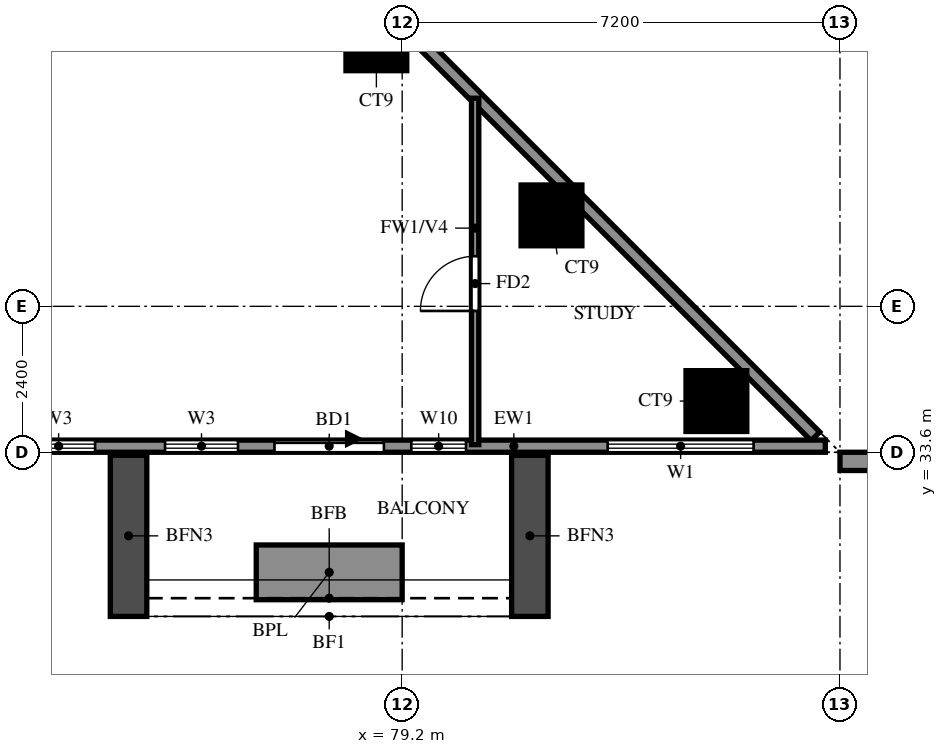
"""IFC4 building model, lengths in metres.
Left out: names, types, materials, properties, quantities, classifications, styles, units other than length and angle.
Written with IfcOpenShell. Run it as: python <this file> out.ifc"""

import sys

from ifc_helpers import new_model, si_unit, direction, frame, frame_2d, origin, origin_2d, place, context, subcontext, project, spatial, rectangle, extrude, source, transform, mapped, element, fill, save


model = new_model("IFC4")
c1 = context("Model", 3, precision=1e-05, world=origin(), true_north=direction((0.0, 1.0)))
c2 = subcontext(c1, "Body", "Model", "MODEL_VIEW")
j1 = project(units=[si_unit("LENGTHUNIT", "METRE"), si_unit("PLANEANGLEUNIT", "RADIAN")], contexts=[c1])
p1 = place(None, origin())
s1 = spatial("IfcSite", under=j1, at=p1, CompositionType="ELEMENT")
p2 = place(p1, origin())
s2 = spatial("IfcBuilding", under=s1, at=p2, CompositionType="ELEMENT")
p3 = place(p2, frame((0.0, 0.0, 79.5)))
s3 = spatial("IfcBuildingStorey", under=s2, at=p3, CompositionType="ELEMENT", Elevation=79.5)
m1 = source(origin(), c2, "Body", "SweptSolid", [
    extrude(rectangle(XDim=1.0, YDim=1.0, at=origin_2d()), origin(), (0.0, 0.0, 1.0), 3.18),
])
for number, where, z_axis, x_axis in (
    (1, (84.367, 34.442, 0.0), (0.0, 0.0, 1.0), (1.0, 0.0, 0.0)),
    (2, (81.656, 37.496, 0.0), (0.0, 0.0, 1.0), (1.0, 0.0, 0.0)),
    (3, (78.776, 40.376, 0.0), (0.0, 0.0, 1.0), (1.0, 0.0, 0.0)),
):
    element("IfcColumn", number, at=place(p3, frame(where, z_axis=z_axis, x_axis=x_axis)), inside=s3, PredefinedType="COLUMN", context=c2, shape_type="MappedRepresentation", body=[
        mapped(m1, transform((0.0, 0.0, 0.0))),
    ])
p4 = place(p3, frame((85.996, 33.863, 0.0), z_axis=(0.0, 0.0, 1.0), x_axis=(-0.707100718496, 0.707112843825, 0.0)))
e4 = element("IfcWall", 4, at=p4, inside=s3, PredefinedType="SOLIDWALL", context=c2, shape_type="SweptSolid", body=[
    extrude(rectangle(XDim=20.135, YDim=0.2, at=frame_2d((10.067, 0.0))), origin(), (0.0, 0.0, 1.0), 3.18),
])
p5 = place(p3, frame((72.5, 33.7, 0.0), z_axis=(0.0, 0.0, 1.0), x_axis=(1.0, 0.0, 0.0)))
e5 = element("IfcWall", 5, at=p5, inside=s3, PredefinedType="SOLIDWALL", context=c2, shape_type="SweptSolid", body=[
    extrude(rectangle(XDim=13.659, YDim=0.2, at=frame_2d((6.829, 0.0))), origin(), (0.0, 0.0, 1.0), 3.18),
])
p6 = place(p5, frame((4.6, 0.0, 0.0)))
e6 = element("IfcOpeningElement", 6, at=p6, cuts=e5, PredefinedType="OPENING", context=c2, shape_type="SweptSolid", body=[
    extrude(rectangle(XDim=1.8, YDim=2.4, at=frame_2d((0.9, 1.2))), frame((0.0, 0.11, 0.0), z_axis=(0.0, -1.0, 0.0), x_axis=(1.0, 0.0, 0.0)), (0.0, 0.0, 1.0), 0.22),
])
p7 = place(p5, frame((0.45, 0.0, 0.6)))
e7 = element("IfcOpeningElement", 7, at=p7, cuts=e5, PredefinedType="OPENING", context=c2, shape_type="SweptSolid", body=[
    extrude(rectangle(XDim=1.2, YDim=2.4, at=frame_2d((0.6, 1.2))), frame((0.0, 0.11, 0.0), z_axis=(0.0, -1.0, 0.0), x_axis=(1.0, 0.0, 0.0)), (0.0, 0.0, 1.0), 0.22),
])
p8 = place(p5, frame((2.8, 0.0, 0.6)))
e8 = element("IfcOpeningElement", 8, at=p8, cuts=e5, PredefinedType="OPENING", context=c2, shape_type="SweptSolid", body=[
    extrude(rectangle(XDim=1.2, YDim=2.4, at=frame_2d((0.6, 1.2))), frame((0.0, 0.11, 0.0), z_axis=(0.0, -1.0, 0.0), x_axis=(1.0, 0.0, 0.0)), (0.0, 0.0, 1.0), 0.22),
])
p9 = place(p5, frame((6.85, 0.0, 0.6)))
e9 = element("IfcOpeningElement", 9, at=p9, cuts=e5, PredefinedType="OPENING", context=c2, shape_type="SweptSolid", body=[
    extrude(rectangle(XDim=0.9, YDim=2.4, at=frame_2d((0.45, 1.2))), frame((0.0, 0.11, 0.0), z_axis=(0.0, -1.0, 0.0), x_axis=(1.0, 0.0, 0.0)), (0.0, 0.0, 1.0), 0.22),
])
p10 = place(p5, frame((10.079, 0.0, 0.6)))
e10 = element("IfcOpeningElement", 10, at=p10, cuts=e5, PredefinedType="OPENING", context=c2, shape_type="SweptSolid", body=[
    extrude(rectangle(XDim=2.4, YDim=2.4, at=frame_2d((1.2, 1.2))), frame((0.0, 0.11, 0.0), z_axis=(0.0, -1.0, 0.0), x_axis=(1.0, 0.0, 0.0)), (0.0, 0.0, 1.0), 0.22),
])
p11 = place(p3, frame((86.4, 33.45, -0.32), z_axis=(0.0, 0.0, 1.0), x_axis=(1.0, 0.0, 0.0)))
e11 = element("IfcWall", 11, at=p11, inside=s3, PredefinedType="SOLIDWALL", context=c2, shape_type="SweptSolid", body=[
    extrude(rectangle(XDim=2.4, YDim=0.3, at=frame_2d((1.2, 0.0))), origin(), (0.0, 0.0, 1.0), 3.5),
])
for number, where, z_axis, x_axis in (
    (12, (74.7, 33.55, 0.0), (0.0, 0.0, 1.0), (0.0, -1.0, 0.0)),
    (13, (81.3, 33.55, 0.0), (0.0, 0.0, 1.0), (0.0, -1.0, 0.0)),
):
    element("IfcWall", number, at=place(p3, frame(where, z_axis=z_axis, x_axis=x_axis)), inside=s3, PredefinedType="SOLIDWALL", context=c2, shape_type="SweptSolid", body=[
        extrude(rectangle(XDim=2.65, YDim=0.6, at=frame_2d((1.325, 0.0))), origin(), (0.0, 0.0, 1.0), 2.85),
    ])
p12 = place(p3, frame((76.8, 31.625, 0.0), z_axis=(0.0, 0.0, 1.0), x_axis=(1.0, 0.0, 0.0)))
e14 = element("IfcWall", 14, at=p12, inside=s3, PredefinedType="SOLIDWALL", context=c2, shape_type="SweptSolid", body=[
    extrude(rectangle(XDim=2.4, YDim=0.9, at=frame_2d((1.2, 0.0))), origin(), (0.0, 0.0, 1.0), 0.9),
])
p13 = place(p3, frame((80.4, 33.725, 0.0), z_axis=(0.0, 0.0, 1.0), x_axis=(0.0, 1.0, 0.0)))
e15 = element("IfcWall", 15, at=p13, inside=s3, PredefinedType="PARTITIONING", context=c2, shape_type="SweptSolid", body=[
    extrude(rectangle(XDim=5.698, YDim=0.12, at=frame_2d((2.849, 0.0))), origin(), (0.0, 0.0, 1.0), 2.28),
])
p14 = place(p13, frame((2.199, 0.0, 0.0)))
e16 = element("IfcOpeningElement", 16, at=p14, cuts=e15, PredefinedType="OPENING", context=c2, shape_type="SweptSolid", body=[
    extrude(rectangle(XDim=0.9, YDim=2.1, at=frame_2d((0.45, 1.05))), frame((0.0, 0.07, 0.0), z_axis=(0.0, -1.0, 0.0), x_axis=(1.0, 0.0, 0.0)), (0.0, 0.0, 1.0), 0.14),
])
p15 = place(p6, origin())
e17 = element("IfcDoor", 17, at=p15, inside=s3, OperationType="DOUBLE_DOOR_SLIDING", PredefinedType="DOOR", context=c2, shape_type="SweptSolid", body=[
    extrude(rectangle(XDim=1.8, YDim=2.4, at=frame_2d((0.9, 1.2))), frame((0.0, 0.025, 0.0), z_axis=(0.0, -1.0, 0.0), x_axis=(1.0, 0.0, 0.0)), (0.0, 0.0, 1.0), 0.05),
])
fill(e6, e17)
p16 = place(p7, origin())
e18 = element("IfcWindow", 18, at=p16, inside=s3, PartitioningType="SINGLE_PANEL", PredefinedType="WINDOW", context=c2, shape_type="SweptSolid", body=[
    extrude(rectangle(XDim=1.2, YDim=2.4, at=frame_2d((0.6, 1.2))), frame((0.0, 0.03, 0.0), z_axis=(0.0, -1.0, 0.0), x_axis=(1.0, 0.0, 0.0)), (0.0, 0.0, 1.0), 0.06),
])
fill(e7, e18)
p17 = place(p8, origin())
e19 = element("IfcWindow", 19, at=p17, inside=s3, PartitioningType="SINGLE_PANEL", PredefinedType="WINDOW", context=c2, shape_type="SweptSolid", body=[
    extrude(rectangle(XDim=1.2, YDim=2.4, at=frame_2d((0.6, 1.2))), frame((0.0, 0.03, 0.0), z_axis=(0.0, -1.0, 0.0), x_axis=(1.0, 0.0, 0.0)), (0.0, 0.0, 1.0), 0.06),
])
fill(e8, e19)
p18 = place(p9, origin())
e20 = element("IfcWindow", 20, at=p18, inside=s3, PartitioningType="SINGLE_PANEL", PredefinedType="WINDOW", context=c2, shape_type="SweptSolid", body=[
    extrude(rectangle(XDim=0.9, YDim=2.4, at=frame_2d((0.45, 1.2))), frame((0.0, 0.03, 0.0), z_axis=(0.0, -1.0, 0.0), x_axis=(1.0, 0.0, 0.0)), (0.0, 0.0, 1.0), 0.06),
])
fill(e9, e20)
p19 = place(p10, origin())
e21 = element("IfcWindow", 21, at=p19, inside=s3, PartitioningType="DOUBLE_PANEL_VERTICAL", PredefinedType="WINDOW", context=c2, shape_type="SweptSolid", body=[
    extrude(rectangle(XDim=2.4, YDim=2.4, at=frame_2d((1.2, 1.2))), frame((0.0, 0.03, 0.0), z_axis=(0.0, -1.0, 0.0), x_axis=(1.0, 0.0, 0.0)), (0.0, 0.0, 1.0), 0.06),
])
fill(e10, e21)
p20 = place(p14, origin())
e22 = element("IfcDoor", 22, at=p20, inside=s3, OperationType="SINGLE_SWING_RIGHT", PredefinedType="DOOR", context=c2, shape_type="SweptSolid", body=[
    extrude(rectangle(XDim=0.9, YDim=2.1, at=frame_2d((0.45, 1.05))), frame((0.0, 0.025, 0.0), z_axis=(0.0, -1.0, 0.0), x_axis=(1.0, 0.0, 0.0)), (0.0, 0.0, 1.0), 0.05),
])
fill(e16, e22)
save(model, sys.argv[1])
